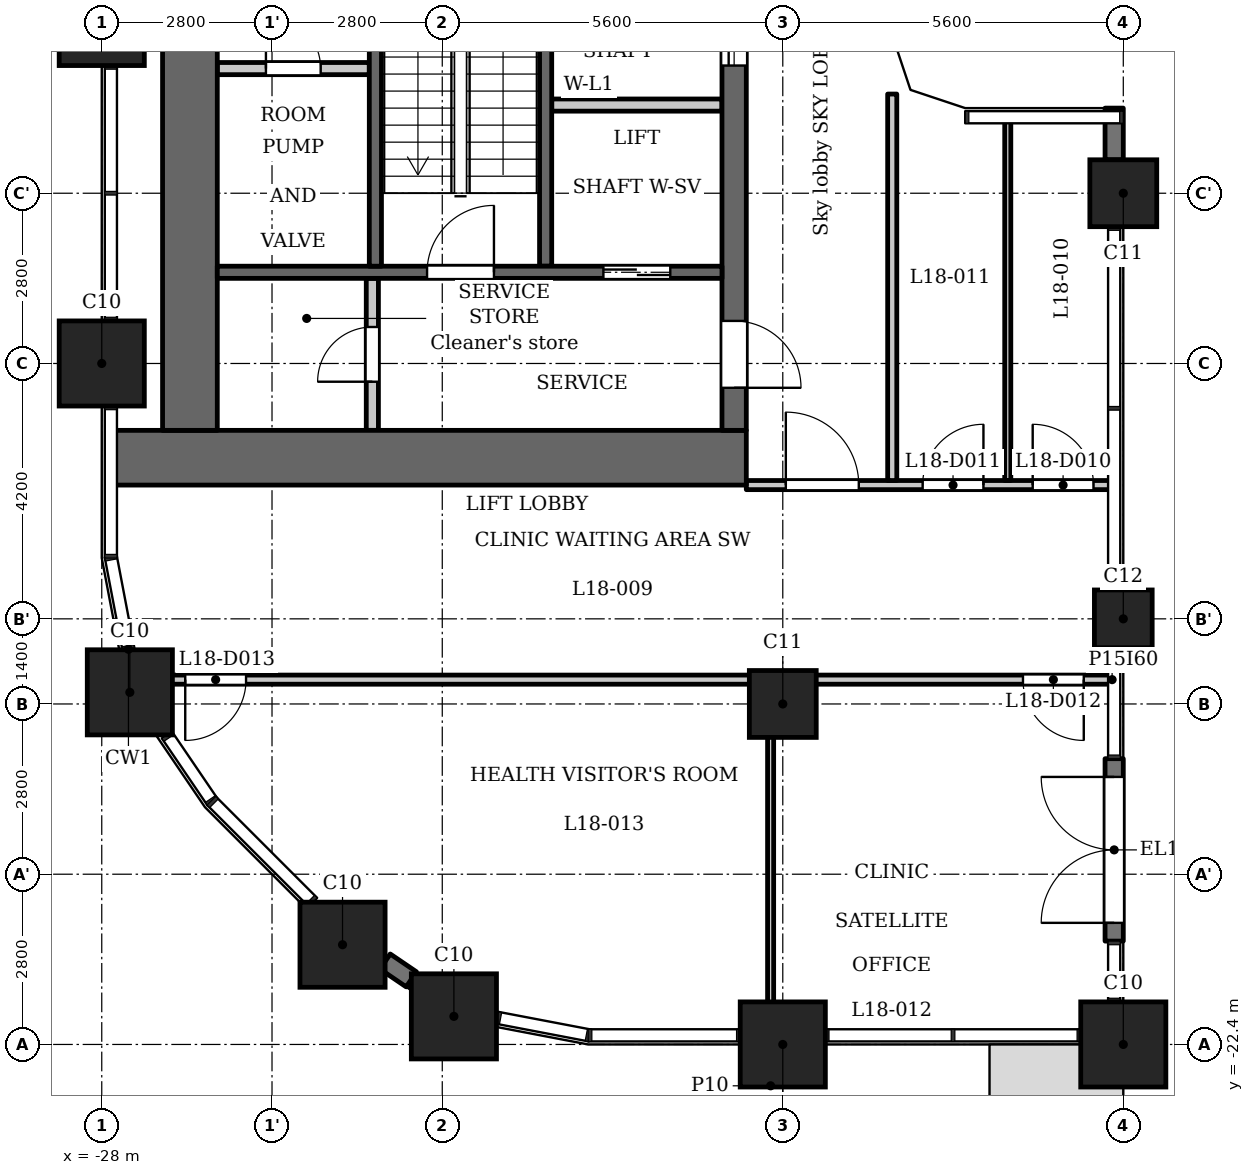
"""IFC4 building model, lengths in metres.
Left out: names, types, materials, properties, quantities, classifications, styles, units other than length and angle.
Written with IfcOpenShell. Run it as: python <this file> out.ifc"""

import sys

from ifc_helpers import new_model, si_unit, direction, frame, frame_2d, origin, origin_2d, place, context, subcontext, project, spatial, polyline, rectangle, outline, extrude, element, fill, save


model = new_model("IFC4")
c1 = context("Model", 3, precision=1e-05, world=origin(), true_north=direction((0.0, 1.0)))
c2 = subcontext(c1, "Body", "Model", "MODEL_VIEW")
j1 = project(units=[si_unit("LENGTHUNIT", "METRE"), si_unit("PLANEANGLEUNIT", "RADIAN")], contexts=[c1])
p1 = place(None, origin())
s1 = spatial("IfcSite", under=j1, at=p1, CompositionType="ELEMENT")
p2 = place(p1, origin())
s2 = spatial("IfcBuilding", under=s1, at=p2, CompositionType="ELEMENT")
p3 = place(p2, frame((0.0, 0.0, 72.5)))
s3 = spatial("IfcBuildingStorey", under=s2, at=p3, CompositionType="ELEMENT", Elevation=72.5)
for number, where, z_axis, x_axis in (
    (1, (-22.209, -21.938, 0.0), (0.0, 0.0, 1.0), (1.0, 0.0, 0.0)),
    (2, (-16.8, -22.4, 0.0), (0.0, 0.0, 1.0), (1.0, 0.0, 0.0)),
    (3, (-11.2, -22.4, 0.0), (0.0, 0.0, 1.0), (1.0, 0.0, 0.0)),
    (4, (-28.0, -5.6, 0.0), (0.0, 0.0, 1.0), (1.0, 0.0, 0.0)),
    (5, (-28.0, -11.2, 0.0), (0.0, 0.0, 1.0), (1.0, 0.0, 0.0)),
    (6, (-27.538, -16.609, 0.0), (0.0, 0.0, 1.0), (1.0, 0.0, 0.0)),
    (7, (-24.04, -20.76, 0.0), (0.0, 0.0, 1.0), (1.0, 0.0, 0.0)),
):
    element("IfcColumn", number, at=place(p3, frame(where, z_axis=z_axis, x_axis=x_axis)), inside=s3, PredefinedType="COLUMN", context=c2, shape_type="SweptSolid", body=[
        extrude(rectangle(XDim=1.4, YDim=1.4, at=origin_2d()), origin(), (0.0, 0.0, 1.0), 5.4),
    ])
for number, where, z_axis, x_axis in (
    (8, (-16.8, -16.8, 0.0), (0.0, 0.0, 1.0), (1.0, 0.0, 0.0)),
    (9, (-11.2, -8.4, 0.0), (0.0, 0.0, 1.0), (1.0, 0.0, 0.0)),
):
    element("IfcColumn", number, at=place(p3, frame(where, z_axis=z_axis, x_axis=x_axis)), inside=s3, PredefinedType="COLUMN", context=c2, shape_type="SweptSolid", body=[
        extrude(rectangle(XDim=1.1, YDim=1.1, at=origin_2d()), origin(), (0.0, 0.0, 1.0), 5.4),
    ])
p4 = place(p3, frame((-11.2, -15.4, 0.0), z_axis=(0.0, 0.0, 1.0), x_axis=(1.0, 0.0, 0.0)))
e10 = element("IfcColumn", 10, at=p4, inside=s3, PredefinedType="COLUMN", context=c2, shape_type="SweptSolid", body=[
    extrude(rectangle(XDim=0.95, YDim=0.95, at=origin_2d()), origin(), (0.0, 0.0, 1.0), 5.4),
])
p5 = place(p3, frame((-11.35, -20.7, 0.0), z_axis=(0.0, 0.0, 1.0), x_axis=(0.0, 1.0, 0.0)))
e11 = element("IfcWall", 11, at=p5, inside=s3, PredefinedType="SOLIDWALL", context=c2, shape_type="SweptSolid", body=[
    extrude(rectangle(XDim=3.0, YDim=0.3, at=frame_2d((1.5, 0.0))), origin(), (0.0, 0.0, 1.0), 4.95),
])
p6 = place(p5, frame((0.3, 0.0, 0.0)))
e12 = element("IfcOpeningElement", 12, at=p6, cuts=e11, PredefinedType="OPENING", context=c2, shape_type="SweptSolid", body=[
    extrude(rectangle(XDim=2.4, YDim=2.3, at=frame_2d((1.2, 1.15))), frame((0.0, 0.16, 0.0), z_axis=(0.0, -1.0, 0.0), x_axis=(1.0, 0.0, 0.0)), (0.0, 0.0, 1.0), 0.32),
])
p7 = place(p3, frame((-23.34, -21.036, 0.0), z_axis=(0.0, 0.0, 1.0), x_axis=(0.827048360589, -0.562130775929, 0.0)))
e13 = element("IfcWall", 13, at=p7, inside=s3, PredefinedType="SOLIDWALL", context=c2, shape_type="SweptSolid", body=[
    extrude(rectangle(XDim=0.522, YDim=0.3, at=frame_2d((0.261, 0.0))), origin(), (0.0, 0.0, 1.0), 4.95),
])
p8 = place(p3, frame((-11.35, -7.85, 0.0), z_axis=(0.0, 0.0, 1.0), x_axis=(0.0, 1.0, 0.0)))
e14 = element("IfcWall", 14, at=p8, inside=s3, PredefinedType="SOLIDWALL", context=c2, shape_type="SweptSolid", body=[
    extrude(rectangle(XDim=0.85, YDim=0.3, at=frame_2d((0.425, 0.0))), origin(), (0.0, 0.0, 1.0), 4.95),
])
p9 = place(p3, frame((-20.7, -9.6, 0.0), z_axis=(0.0, 0.0, 1.0), x_axis=(0.0, 1.0, 0.0)))
e15 = element("IfcWall", 15, at=p9, inside=s3, PredefinedType="SHEAR", context=c2, shape_type="SweptSolid", body=[
    extrude(rectangle(XDim=9.75, YDim=0.2, at=frame_2d((4.875, 0.0))), origin(), (0.0, 0.0, 1.0), 4.95),
])
p10 = place(p3, frame((-17.4, -12.75, 0.0), z_axis=(0.0, 0.0, 1.0), x_axis=(-1.0, 0.0, 0.0)))
e16 = element("IfcWall", 16, at=p10, inside=s3, PredefinedType="SHEAR", context=c2, shape_type="SweptSolid", body=[
    extrude(rectangle(XDim=10.4, YDim=0.9, at=frame_2d((5.2, 0.0))), origin(), (0.0, 0.0, 1.0), 4.95),
])
p11 = place(p3, frame((-17.6, -12.3, 0.0), z_axis=(0.0, 0.0, 1.0), x_axis=(0.0, 1.0, 0.0)))
e17 = element("IfcWall", 17, at=p11, inside=s3, PredefinedType="SHEAR", context=c2, shape_type="SweptSolid", body=[
    extrude(rectangle(XDim=24.6, YDim=0.4, at=frame_2d((12.3, 0.0))), origin(), (0.0, 0.0, 1.0), 4.95),
])
p12 = place(p11, frame((6.0, 0.0, 0.0)))
e18 = element("IfcOpeningElement", 18, at=p12, cuts=e17, PredefinedType="OPENING", context=c2, shape_type="SweptSolid", body=[
    extrude(rectangle(XDim=1.1, YDim=2.1, at=frame_2d((0.55, 1.05))), frame((0.0, 0.21, 0.0), z_axis=(0.0, -1.0, 0.0), x_axis=(1.0, 0.0, 0.0)), (0.0, 0.0, 1.0), 0.42),
])
p13 = place(p11, frame((8.4, 0.0, 0.0)))
e19 = element("IfcOpeningElement", 19, at=p13, cuts=e17, PredefinedType="OPENING", context=c2, shape_type="SweptSolid", body=[
    extrude(rectangle(XDim=1.1, YDim=2.1, at=frame_2d((0.55, 1.05))), frame((0.0, 0.21, 0.0), z_axis=(0.0, -1.0, 0.0), x_axis=(1.0, 0.0, 0.0)), (0.0, 0.0, 1.0), 0.42),
])
p14 = place(p11, frame((10.8, 0.0, 0.0)))
e20 = element("IfcOpeningElement", 20, at=p14, cuts=e17, PredefinedType="OPENING", context=c2, shape_type="SweptSolid", body=[
    extrude(rectangle(XDim=1.1, YDim=2.1, at=frame_2d((0.55, 1.05))), frame((0.0, 0.21, 0.0), z_axis=(0.0, -1.0, 0.0), x_axis=(1.0, 0.0, 0.0)), (0.0, 0.0, 1.0), 0.42),
])
p15 = place(p11, frame((16.75, 0.0, 0.0)))
e21 = element("IfcOpeningElement", 21, at=p15, cuts=e17, PredefinedType="OPENING", context=c2, shape_type="SweptSolid", body=[
    extrude(rectangle(XDim=0.9, YDim=2.1, at=frame_2d((0.45, 1.05))), frame((0.0, 0.21, 0.0), z_axis=(0.0, -1.0, 0.0), x_axis=(1.0, 0.0, 0.0)), (0.0, 0.0, 1.0), 0.42),
])
p16 = place(p11, frame((22.8, 0.0, 0.0)))
e22 = element("IfcOpeningElement", 22, at=p16, cuts=e17, PredefinedType="OPENING", context=c2, shape_type="SweptSolid", body=[
    extrude(rectangle(XDim=1.1, YDim=2.1, at=frame_2d((0.55, 1.05))), frame((0.0, 0.21, 0.0), z_axis=(0.0, -1.0, 0.0), x_axis=(1.0, 0.0, 0.0)), (0.0, 0.0, 1.0), 0.42),
])
p17 = place(p11, frame((0.7, 0.0, 0.0)))
e23 = element("IfcOpeningElement", 23, at=p17, cuts=e17, PredefinedType="OPENING", context=c2, shape_type="SweptSolid", body=[
    extrude(rectangle(XDim=1.1, YDim=2.1, at=frame_2d((0.55, 1.05))), frame((0.0, 0.21, 0.0), z_axis=(0.0, -1.0, 0.0), x_axis=(1.0, 0.0, 0.0)), (0.0, 0.0, 1.0), 0.42),
])
p18 = place(p11, frame((12.775, 0.0, 0.0)))
e24 = element("IfcOpeningElement", 24, at=p18, cuts=e17, PredefinedType="OPENING", context=c2, shape_type="SweptSolid", body=[
    extrude(rectangle(XDim=1.8, YDim=2.1, at=frame_2d((0.9, 1.05))), frame((0.0, 0.21, 0.0), z_axis=(0.0, -1.0, 0.0), x_axis=(1.0, 0.0, 0.0)), (0.0, 0.0, 1.0), 0.42),
])
p19 = place(p3, frame((-26.55, -12.3, 0.0), z_axis=(0.0, 0.0, 1.0), x_axis=(0.0, 1.0, 0.0)))
e25 = element("IfcWall", 25, at=p19, inside=s3, PredefinedType="SHEAR", context=c2, shape_type="SweptSolid", body=[
    extrude(rectangle(XDim=24.6, YDim=0.9, at=frame_2d((12.3, 0.0))), origin(), (0.0, 0.0, 1.0), 4.95),
])
p20 = place(p3, frame((-23.55, -12.3, 0.0), z_axis=(0.0, 0.0, 1.0), x_axis=(0.0, 1.0, 0.0)))
e26 = element("IfcWall", 26, at=p20, inside=s3, PredefinedType="PARTITIONING", context=c2, shape_type="SweptSolid", body=[
    extrude(rectangle(XDim=2.5, YDim=0.2, at=frame_2d((1.25, 0.0))), origin(), (0.0, 0.0, 1.0), 4.95),
])
p21 = place(p20, frame((0.8, 0.0, 0.0)))
e27 = element("IfcOpeningElement", 27, at=p21, cuts=e26, PredefinedType="OPENING", context=c2, shape_type="SweptSolid", body=[
    extrude(rectangle(XDim=0.9, YDim=2.1, at=frame_2d((0.45, 1.05))), frame((0.0, 0.11, 0.0), z_axis=(0.0, -1.0, 0.0), x_axis=(1.0, 0.0, 0.0)), (0.0, 0.0, 1.0), 0.22),
])
p22 = place(p3, frame((-23.6, -6.35, 0.0), z_axis=(0.0, 0.0, 1.0), x_axis=(-1.0, 0.0, 0.0)))
e28 = element("IfcWall", 28, at=p22, inside=s3, PredefinedType="PARTITIONING", context=c2, shape_type="SweptSolid", body=[
    extrude(rectangle(XDim=2.5, YDim=0.2, at=frame_2d((1.25, 0.0))), origin(), (0.0, 0.0, 1.0), 4.95),
])
p23 = place(p22, frame((0.8, 0.0, 0.0)))
e29 = element("IfcOpeningElement", 29, at=p23, cuts=e28, PredefinedType="OPENING", context=c2, shape_type="SweptSolid", body=[
    extrude(rectangle(XDim=0.9, YDim=2.1, at=frame_2d((0.45, 1.05))), frame((0.0, 0.11, 0.0), z_axis=(0.0, -1.0, 0.0), x_axis=(1.0, 0.0, 0.0)), (0.0, 0.0, 1.0), 0.22),
])
p24 = place(p3, frame((-17.8, -9.7, 0.0), z_axis=(0.0, 0.0, 1.0), x_axis=(-1.0, 0.0, 0.0)))
e30 = element("IfcWall", 30, at=p24, inside=s3, PredefinedType="SHEAR", context=c2, shape_type="SweptSolid", body=[
    extrude(rectangle(XDim=8.3, YDim=0.2, at=frame_2d((4.15, 0.0))), origin(), (0.0, 0.0, 1.0), 4.95),
])
p25 = place(p24, frame((0.85, 0.0, 0.0)))
e31 = element("IfcOpeningElement", 31, at=p25, cuts=e30, PredefinedType="OPENING", context=c2, shape_type="SweptSolid", body=[
    extrude(rectangle(XDim=1.1, YDim=2.1, at=frame_2d((0.55, 1.05))), frame((0.0, 0.11, 0.0), z_axis=(0.0, -1.0, 0.0), x_axis=(1.0, 0.0, 0.0)), (0.0, 0.0, 1.0), 0.22),
])
p26 = place(p24, frame((3.75, 0.0, 0.0)))
e32 = element("IfcOpeningElement", 32, at=p26, cuts=e30, PredefinedType="OPENING", context=c2, shape_type="SweptSolid", body=[
    extrude(rectangle(XDim=1.1, YDim=2.1, at=frame_2d((0.55, 1.05))), frame((0.0, 0.11, 0.0), z_axis=(0.0, -1.0, 0.0), x_axis=(1.0, 0.0, 0.0)), (0.0, 0.0, 1.0), 0.22),
])
p27 = place(p3, frame((-17.8, -6.95, 0.0), z_axis=(0.0, 0.0, 1.0), x_axis=(-1.0, 0.0, 0.0)))
e33 = element("IfcWall", 33, at=p27, inside=s3, PredefinedType="PARTITIONING", context=c2, shape_type="SweptSolid", body=[
    extrude(rectangle(XDim=2.8, YDim=0.2, at=frame_2d((1.4, 0.0))), origin(), (0.0, 0.0, 1.0), 4.95),
])
p28 = place(p3, frame((-23.5, -9.6, 0.0), z_axis=(0.0, 0.0, 1.0), x_axis=(0.0, 1.0, 0.0)))
e34 = element("IfcWall", 34, at=p28, inside=s3, PredefinedType="SHEAR", context=c2, shape_type="SweptSolid", body=[
    extrude(rectangle(XDim=6.9, YDim=0.2, at=frame_2d((3.45, 0.0))), origin(), (0.0, 0.0, 1.0), 4.95),
])
p29 = place(p3, frame((-27.52, -16.4, 0.0), z_axis=(0.0, 0.0, 1.0), x_axis=(1.0, 0.0, 0.0)))
e35 = element("IfcWall", 35, at=p29, inside=s3, PredefinedType="PARTITIONING", context=c2, shape_type="SweptSolid", body=[
    extrude(rectangle(XDim=16.136, YDim=0.15, at=frame_2d((8.068, 0.0))), origin(), (0.0, 0.0, 1.0), 4.95),
])
p30 = place(p29, frame((14.67, 0.0, 0.0)))
e36 = element("IfcOpeningElement", 36, at=p30, cuts=e35, PredefinedType="OPENING", context=c2, shape_type="SweptSolid", body=[
    extrude(rectangle(XDim=1.0, YDim=2.1, at=frame_2d((0.5, 1.05))), frame((0.0, 0.085, 0.0), z_axis=(0.0, -1.0, 0.0), x_axis=(1.0, 0.0, 0.0)), (0.0, 0.0, 1.0), 0.17),
])
p31 = place(p29, frame((0.893, 0.0, 0.0)))
e37 = element("IfcOpeningElement", 37, at=p31, cuts=e35, PredefinedType="OPENING", context=c2, shape_type="SweptSolid", body=[
    extrude(rectangle(XDim=1.0, YDim=2.1, at=frame_2d((0.5, 1.05))), frame((0.0, 0.085, 0.0), z_axis=(0.0, -1.0, 0.0), x_axis=(1.0, 0.0, 0.0)), (0.0, 0.0, 1.0), 0.17),
])
p32 = place(p3, frame((-17.4, -13.2, 0.0), z_axis=(0.0, 0.0, 1.0), x_axis=(1.0, 0.0, 0.0)))
e38 = element("IfcWall", 38, at=p32, inside=s3, PredefinedType="PARTITIONING", context=c2, shape_type="SweptSolid", body=[
    extrude(rectangle(XDim=6.016, YDim=0.15, at=frame_2d((3.008, 0.0))), origin(), (0.0, 0.0, 1.0), 4.95),
])
p33 = place(p32, frame((0.65, 0.0, 0.0)))
e39 = element("IfcOpeningElement", 39, at=p33, cuts=e38, PredefinedType="OPENING", context=c2, shape_type="SweptSolid", body=[
    extrude(rectangle(XDim=1.2, YDim=2.1, at=frame_2d((0.6, 1.05))), frame((0.0, 0.085, 0.0), z_axis=(0.0, -1.0, 0.0), x_axis=(1.0, 0.0, 0.0)), (0.0, 0.0, 1.0), 0.17),
])
p34 = place(p32, frame((4.71, 0.0, 0.0)))
e40 = element("IfcOpeningElement", 40, at=p34, cuts=e38, PredefinedType="OPENING", context=c2, shape_type="SweptSolid", body=[
    extrude(rectangle(XDim=1.0, YDim=2.1, at=frame_2d((0.5, 1.05))), frame((0.0, 0.085, 0.0), z_axis=(0.0, -1.0, 0.0), x_axis=(1.0, 0.0, 0.0)), (0.0, 0.0, 1.0), 0.17),
])
p35 = place(p32, frame((2.9, 0.0, 0.0)))
e41 = element("IfcOpeningElement", 41, at=p35, cuts=e38, PredefinedType="OPENING", context=c2, shape_type="SweptSolid", body=[
    extrude(rectangle(XDim=1.0, YDim=2.1, at=frame_2d((0.5, 1.05))), frame((0.0, 0.085, 0.0), z_axis=(0.0, -1.0, 0.0), x_axis=(1.0, 0.0, 0.0)), (0.0, 0.0, 1.0), 0.17),
])
p36 = place(p3, frame((-17.0, -23.08, 0.0), z_axis=(0.0, 0.0, 1.0), x_axis=(0.0, 1.0, 0.0)))
e42 = element("IfcWall", 42, at=p36, inside=s3, PredefinedType="PARTITIONING", context=c2, shape_type="SweptSolid", body=[
    extrude(rectangle(XDim=6.605, YDim=0.1, at=frame_2d((3.302, 0.0))), origin(), (0.0, 0.0, 1.0), 4.95),
])
p37 = place(p3, frame((-15.0, -13.125, 0.0), z_axis=(0.0, 0.0, 1.0), x_axis=(0.0, 1.0, 0.0)))
e43 = element("IfcWall", 43, at=p37, inside=s3, PredefinedType="PARTITIONING", context=c2, shape_type="SweptSolid", body=[
    extrude(rectangle(XDim=6.356, YDim=0.15, at=frame_2d((3.178, 0.0))), origin(), (0.0, 0.0, 1.0), 4.95),
])
p38 = place(p3, frame((-13.1, -13.125, 0.0), z_axis=(0.0, 0.0, 1.0), x_axis=(0.0, 1.0, 0.0)))
e44 = element("IfcWall", 44, at=p38, inside=s3, PredefinedType="PARTITIONING", context=c2, shape_type="SweptSolid", body=[
    extrude(rectangle(XDim=5.941, YDim=0.1, at=frame_2d((2.97, 0.0))), origin(), (0.0, 0.0, 1.0), 4.95),
])
p39 = place(p3, origin())
e45 = element("IfcWall", 45, at=p39, inside=s3, PredefinedType="SOLIDWALL", context=c2, shape_type="SweptSolid", body=[
    extrude(outline(polyline([(-13.8, -7.0), (-14.7, -6.7), (-15.0, -5.8), (-15.3, -5.8), (-15.3, -5.849), (-14.937, -6.937), (-13.849, -7.3), (-13.8, -7.3), (-13.8, -7.0)])), origin(), (0.0, 0.0, 1.0), 4.95),
])
p40 = place(p6, origin())
e46 = element("IfcDoor", 46, at=p40, inside=s3, OperationType="SINGLE_SWING_LEFT", PredefinedType="DOOR", context=c2, shape_type="SweptSolid", body=[
    extrude(rectangle(XDim=2.4, YDim=2.3, at=frame_2d((1.2, 1.15))), frame((0.0, 0.025, 0.0), z_axis=(0.0, -1.0, 0.0), x_axis=(1.0, 0.0, 0.0)), (0.0, 0.0, 1.0), 0.05),
])
fill(e12, e46)
p41 = place(p25, origin())
e47 = element("IfcDoor", 47, at=p41, inside=s3, OperationType="DOUBLE_DOOR_SLIDING", PredefinedType="DOOR", context=c2, shape_type="SweptSolid", body=[
    extrude(rectangle(XDim=1.1, YDim=2.1, at=frame_2d((0.55, 1.05))), frame((0.0, 0.025, 0.0), z_axis=(0.0, -1.0, 0.0), x_axis=(1.0, 0.0, 0.0)), (0.0, 0.0, 1.0), 0.05),
])
fill(e31, e47)
p42 = place(p12, origin())
e48 = element("IfcDoor", 48, at=p42, inside=s3, OperationType="DOUBLE_DOOR_SLIDING", PredefinedType="DOOR", context=c2, shape_type="SweptSolid", body=[
    extrude(rectangle(XDim=1.1, YDim=2.1, at=frame_2d((0.55, 1.05))), frame((0.0, 0.025, 0.0), z_axis=(0.0, -1.0, 0.0), x_axis=(1.0, 0.0, 0.0)), (0.0, 0.0, 1.0), 0.05),
])
fill(e18, e48)
p43 = place(p17, origin())
e49 = element("IfcDoor", 49, at=p43, inside=s3, OperationType="SINGLE_SWING_LEFT", PredefinedType="DOOR", context=c2, shape_type="SweptSolid", body=[
    extrude(rectangle(XDim=1.1, YDim=2.1, at=frame_2d((0.55, 1.05))), frame((0.0, 0.025, 0.0), z_axis=(0.0, -1.0, 0.0), x_axis=(1.0, 0.0, 0.0)), (0.0, 0.0, 1.0), 0.05),
])
fill(e23, e49)
p44 = place(p21, origin())
e50 = element("IfcDoor", 50, at=p44, inside=s3, OperationType="SINGLE_SWING_RIGHT", PredefinedType="DOOR", context=c2, shape_type="SweptSolid", body=[
    extrude(rectangle(XDim=0.9, YDim=2.1, at=frame_2d((0.45, 1.05))), frame((0.0, 0.025, 0.0), z_axis=(0.0, -1.0, 0.0), x_axis=(1.0, 0.0, 0.0)), (0.0, 0.0, 1.0), 0.05),
])
fill(e27, e50)
p45 = place(p26, origin())
e51 = element("IfcDoor", 51, at=p45, inside=s3, OperationType="SINGLE_SWING_LEFT", PredefinedType="DOOR", context=c2, shape_type="SweptSolid", body=[
    extrude(rectangle(XDim=1.1, YDim=2.1, at=frame_2d((0.55, 1.05))), frame((0.0, 0.025, 0.0), z_axis=(0.0, -1.0, 0.0), x_axis=(1.0, 0.0, 0.0)), (0.0, 0.0, 1.0), 0.05),
])
fill(e32, e51)
p46 = place(p23, origin())
e52 = element("IfcDoor", 52, at=p46, inside=s3, OperationType="SINGLE_SWING_RIGHT", PredefinedType="DOOR", context=c2, shape_type="SweptSolid", body=[
    extrude(rectangle(XDim=0.9, YDim=2.1, at=frame_2d((0.45, 1.05))), frame((0.0, 0.025, 0.0), z_axis=(0.0, -1.0, 0.0), x_axis=(1.0, 0.0, 0.0)), (0.0, 0.0, 1.0), 0.05),
])
fill(e29, e52)
p47 = place(p33, origin())
e53 = element("IfcDoor", 53, at=p47, inside=s3, OperationType="SINGLE_SWING_RIGHT", PredefinedType="DOOR", context=c2, shape_type="SweptSolid", body=[
    extrude(rectangle(XDim=1.2, YDim=2.1, at=frame_2d((0.6, 1.05))), frame((0.0, 0.025, 0.0), z_axis=(0.0, -1.0, 0.0), x_axis=(1.0, 0.0, 0.0)), (0.0, 0.0, 1.0), 0.05),
])
fill(e39, e53)
p48 = place(p34, origin())
e54 = element("IfcDoor", 54, at=p48, inside=s3, OperationType="SINGLE_SWING_RIGHT", PredefinedType="DOOR", context=c2, shape_type="SweptSolid", body=[
    extrude(rectangle(XDim=1.0, YDim=2.1, at=frame_2d((0.5, 1.05))), frame((0.0, 0.025, 0.0), z_axis=(0.0, -1.0, 0.0), x_axis=(1.0, 0.0, 0.0)), (0.0, 0.0, 1.0), 0.05),
])
fill(e40, e54)
p49 = place(p35, origin())
e55 = element("IfcDoor", 55, at=p49, inside=s3, OperationType="SINGLE_SWING_LEFT", PredefinedType="DOOR", context=c2, shape_type="SweptSolid", body=[
    extrude(rectangle(XDim=1.0, YDim=2.1, at=frame_2d((0.5, 1.05))), frame((0.0, 0.025, 0.0), z_axis=(0.0, -1.0, 0.0), x_axis=(1.0, 0.0, 0.0)), (0.0, 0.0, 1.0), 0.05),
])
fill(e41, e55)
p50 = place(p30, origin())
e56 = element("IfcDoor", 56, at=p50, inside=s3, OperationType="SINGLE_SWING_RIGHT", PredefinedType="DOOR", context=c2, shape_type="SweptSolid", body=[
    extrude(rectangle(XDim=1.0, YDim=2.1, at=frame_2d((0.5, 1.05))), frame((0.0, 0.025, 0.0), z_axis=(0.0, -1.0, 0.0), x_axis=(1.0, 0.0, 0.0)), (0.0, 0.0, 1.0), 0.05),
])
fill(e36, e56)
p51 = place(p31, origin())
e57 = element("IfcDoor", 57, at=p51, inside=s3, OperationType="SINGLE_SWING_LEFT", PredefinedType="DOOR", context=c2, shape_type="SweptSolid", body=[
    extrude(rectangle(XDim=1.0, YDim=2.1, at=frame_2d((0.5, 1.05))), frame((0.0, 0.025, 0.0), z_axis=(0.0, -1.0, 0.0), x_axis=(1.0, 0.0, 0.0)), (0.0, 0.0, 1.0), 0.05),
])
fill(e37, e57)
save(model, sys.argv[1])
